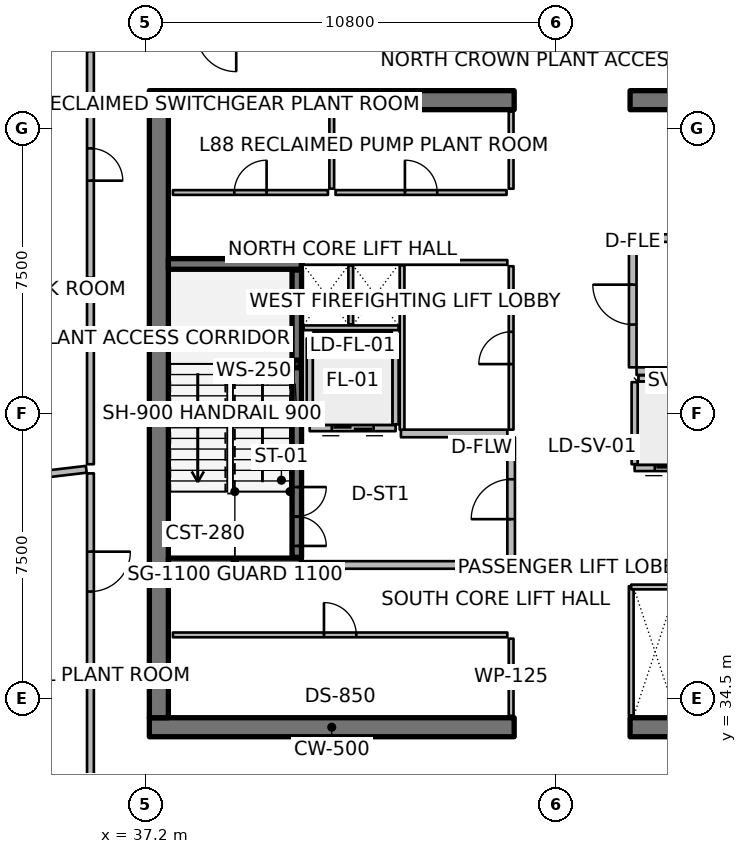
"""IFC4 building model, lengths in metres.
Left out: names, types, materials, properties, quantities, classifications, styles, units other than length and angle.
Written with IfcOpenShell. Run it as: python <this file> out.ifc"""

import sys

from ifc_helpers import new_model, si_unit, direction, frame, frame_2d, origin, origin_2d, place, context, subcontext, project, spatial, rectangle, hollow_rectangle, extrude, element, fill, save


model = new_model("IFC4")
c1 = context("Model", 3, precision=1e-05, world=origin(), true_north=direction((0.0, 1.0)))
c2 = subcontext(c1, "Body", "Model", "MODEL_VIEW")
j1 = project(units=[si_unit("LENGTHUNIT", "METRE"), si_unit("PLANEANGLEUNIT", "RADIAN")], contexts=[c1])
p1 = place(None, origin())
s1 = spatial("IfcSite", under=j1, at=p1, CompositionType="ELEMENT")
p2 = place(p1, origin())
s2 = spatial("IfcBuilding", under=s1, at=p2, CompositionType="ELEMENT")
p3 = place(p2, frame((0.0, 0.0, 351.5)))
s3 = spatial("IfcBuildingStorey", under=s2, at=p3, CompositionType="ELEMENT", Elevation=351.5)
p4 = place(p3, frame((37.3, 33.75, 0.0), z_axis=(0.0, 0.0, 1.0), x_axis=(1.0, 0.0, 0.0)))
e1 = element("IfcWall", 1, at=p4, inside=s3, PredefinedType="SHEAR", context=c2, shape_type="SweptSolid", body=[
    extrude(rectangle(XDim=9.6, YDim=0.5, at=frame_2d((4.8, 0.0))), origin(), (0.0, 0.0, 1.0), 4.5),
])
p5 = place(p3, frame((49.95, 33.75, 0.0), z_axis=(0.0, 0.0, 1.0), x_axis=(1.0, 0.0, 0.0)))
e2 = element("IfcWall", 2, at=p5, inside=s3, PredefinedType="SHEAR", context=c2, shape_type="SweptSolid", body=[
    extrude(rectangle(XDim=9.6, YDim=0.5, at=frame_2d((4.8, 0.0))), origin(), (0.0, 0.0, 1.0), 4.5),
])
p6 = place(p3, frame((37.3, 50.25, 0.0), z_axis=(0.0, 0.0, 1.0), x_axis=(1.0, 0.0, 0.0)))
e3 = element("IfcWall", 3, at=p6, inside=s3, PredefinedType="SHEAR", context=c2, shape_type="SweptSolid", body=[
    extrude(rectangle(XDim=9.6, YDim=0.5, at=frame_2d((4.8, 0.0))), origin(), (0.0, 0.0, 1.0), 4.5),
])
p7 = place(p3, frame((49.95, 50.25, 0.0), z_axis=(0.0, 0.0, 1.0), x_axis=(1.0, 0.0, 0.0)))
e4 = element("IfcWall", 4, at=p7, inside=s3, PredefinedType="SHEAR", context=c2, shape_type="SweptSolid", body=[
    extrude(rectangle(XDim=9.6, YDim=0.5, at=frame_2d((4.8, 0.0))), origin(), (0.0, 0.0, 1.0), 4.5),
])
p8 = place(p3, frame((37.55, 34.0, 0.0), z_axis=(0.0, 0.0, 1.0), x_axis=(0.0, 1.0, 0.0)))
e5 = element("IfcWall", 5, at=p8, inside=s3, PredefinedType="SHEAR", context=c2, shape_type="SweptSolid", body=[
    extrude(rectangle(XDim=16.0, YDim=0.5, at=frame_2d((8.0, 0.0))), origin(), (0.0, 0.0, 1.0), 4.5),
])
for number, where, z_axis, x_axis in (
    (6, (37.8, 38.06, 0.0), (0.0, 0.0, 1.0), (1.0, 0.0, 0.0)),
    (7, (37.8, 45.94, 0.0), (0.0, 0.0, 1.0), (1.0, 0.0, 0.0)),
):
    element("IfcWall", number, at=place(p3, frame(where, z_axis=z_axis, x_axis=x_axis)), inside=s3, PredefinedType="SHEAR", context=c2, shape_type="SweptSolid", body=[
        extrude(rectangle(XDim=3.5, YDim=0.28, at=frame_2d((1.75, 0.0))), origin(), (0.0, 0.0, 1.0), 4.5),
    ])
p9 = place(p3, frame((41.18, 43.31, 0.0), z_axis=(0.0, 0.0, 1.0), x_axis=(1.0, 0.0, 0.0)))
e8 = element("IfcColumn", 8, at=p9, inside=s3, PredefinedType="COLUMN", context=c2, shape_type="SweptSolid", body=[
    extrude(hollow_rectangle(XDim=0.2, YDim=0.2, WallThickness=0.01, InnerFilletRadius=0.01, OuterFilletRadius=0.02, at=origin_2d()), origin(), (0.0, 0.0, 1.0), 2.045),
])
p10 = place(p3, frame((41.18, 38.22, 0.0), z_axis=(0.0, 0.0, 1.0), x_axis=(0.0, 1.0, 0.0)))
e9 = element("IfcWall", 9, at=p10, inside=s3, PredefinedType="SOLIDWALL", context=c2, shape_type="SweptSolid", body=[
    extrude(rectangle(XDim=7.56, YDim=0.25, at=frame_2d((3.78, 0.0))), origin(), (0.0, 0.0, 1.0), 4.22),
])
p11 = place(p10, frame((0.3, 0.0, 0.0)))
e10 = element("IfcOpeningElement", 10, at=p11, cuts=e9, PredefinedType="OPENING", context=c2, shape_type="SweptSolid", body=[
    extrude(rectangle(XDim=1.55, YDim=2.15, at=frame_2d((0.775, 1.075))), frame((0.0, 0.135, 0.0), z_axis=(0.0, -1.0, 0.0), x_axis=(1.0, 0.0, 0.0)), (0.0, 0.0, 1.0), 0.27),
])
p12 = place(p3, frame((43.78, 41.62, 0.0), z_axis=(0.0, 0.0, 1.0), x_axis=(-1.0, 0.0, 0.0)))
e11 = element("IfcWall", 11, at=p12, inside=s3, PredefinedType="PARTITIONING", context=c2, shape_type="SweptSolid", body=[
    extrude(rectangle(XDim=2.26, YDim=0.16, at=frame_2d((1.13, 0.0))), origin(), (0.0, 0.0, 1.0), 4.22),
])
p13 = place(p12, frame((0.58, 0.0, 0.0)))
e12 = element("IfcOpeningElement", 12, at=p13, cuts=e11, PredefinedType="OPENING", context=c2, shape_type="SweptSolid", body=[
    extrude(rectangle(XDim=1.1, YDim=2.1, at=frame_2d((0.55, 1.05))), frame((0.0, 0.09, 0.0), z_axis=(0.0, -1.0, 0.0), x_axis=(1.0, 0.0, 0.0)), (0.0, 0.0, 1.0), 0.18),
])
for number, where, z_axis, x_axis in (
    (13, (43.78, 41.72, 0.0), (0.0, 0.0, 1.0), (0.0, 1.0, 0.0)),
    (14, (41.52, 41.72, 0.0), (0.0, 0.0, 1.0), (0.0, 1.0, 0.0)),
):
    element("IfcWall", number, at=place(p3, frame(where, z_axis=z_axis, x_axis=x_axis)), inside=s3, PredefinedType="PARTITIONING", context=c2, shape_type="SweptSolid", body=[
        extrude(rectangle(XDim=2.26, YDim=0.16, at=frame_2d((1.13, 0.0))), origin(), (0.0, 0.0, 1.0), 4.22),
    ])
p14 = place(p3, frame((41.62, 44.08, 0.0), z_axis=(0.0, 0.0, 1.0), x_axis=(1.0, 0.0, 0.0)))
e15 = element("IfcWall", 15, at=p14, inside=s3, PredefinedType="PARTITIONING", context=c2, shape_type="SweptSolid", body=[
    extrude(rectangle(XDim=2.06, YDim=0.16, at=frame_2d((1.03, 0.0))), origin(), (0.0, 0.0, 1.0), 4.22),
])
p15 = place(p3, frame((52.23, 40.57, 0.0), z_axis=(0.0, 0.0, 1.0), x_axis=(-1.0, 0.0, 0.0)))
e16 = element("IfcWall", 16, at=p15, inside=s3, PredefinedType="PARTITIONING", context=c2, shape_type="SweptSolid", body=[
    extrude(rectangle(XDim=2.16, YDim=0.16, at=frame_2d((1.08, 0.0))), origin(), (0.0, 0.0, 1.0), 4.22),
])
p16 = place(p15, frame((0.53, 0.0, 0.0)))
e17 = element("IfcOpeningElement", 17, at=p16, cuts=e16, PredefinedType="OPENING", context=c2, shape_type="SweptSolid", body=[
    extrude(rectangle(XDim=1.1, YDim=2.1, at=frame_2d((0.55, 1.05))), frame((0.0, 0.09, 0.0), z_axis=(0.0, -1.0, 0.0), x_axis=(1.0, 0.0, 0.0)), (0.0, 0.0, 1.0), 0.18),
])
p17 = place(p3, frame((50.07, 40.67, 0.0), z_axis=(0.0, 0.0, 1.0), x_axis=(0.0, 1.0, 0.0)))
e18 = element("IfcWall", 18, at=p17, inside=s3, PredefinedType="PARTITIONING", context=c2, shape_type="SweptSolid", body=[
    extrude(rectangle(XDim=2.16, YDim=0.16, at=frame_2d((1.08, 0.0))), origin(), (0.0, 0.0, 1.0), 4.22),
])
p18 = place(p3, frame((50.17, 42.93, 0.0), z_axis=(0.0, 0.0, 1.0), x_axis=(1.0, 0.0, 0.0)))
e19 = element("IfcWall", 19, at=p18, inside=s3, PredefinedType="PARTITIONING", context=c2, shape_type="SweptSolid", body=[
    extrude(rectangle(XDim=1.96, YDim=0.16, at=frame_2d((0.98, 0.0))), origin(), (0.0, 0.0, 1.0), 4.22),
])
p19 = place(p3, frame((46.82, 34.05, 0.0), z_axis=(0.0, 0.0, 1.0), x_axis=(0.0, 1.0, 0.0)))
e20 = element("IfcWall", 20, at=p19, inside=s3, PredefinedType="PARTITIONING", context=c2, shape_type="SweptSolid", body=[
    extrude(rectangle(XDim=2.03, YDim=0.125, at=frame_2d((1.015, 0.0))), origin(), (0.0, 0.0, 1.0), 3.66),
])
p20 = place(p3, frame((37.92, 36.18, 0.0), z_axis=(0.0, 0.0, 1.0), x_axis=(1.0, 0.0, 0.0)))
e21 = element("IfcWall", 21, at=p20, inside=s3, PredefinedType="PARTITIONING", context=c2, shape_type="SweptSolid", body=[
    extrude(rectangle(XDim=8.8, YDim=0.125, at=frame_2d((4.4, 0.0))), origin(), (0.0, 0.0, 1.0), 3.66),
])
p21 = place(p20, frame((3.975, 0.0, 0.0)))
e22 = element("IfcOpeningElement", 22, at=p21, cuts=e21, PredefinedType="OPENING", context=c2, shape_type="SweptSolid", body=[
    extrude(rectangle(XDim=0.85, YDim=2.06, at=frame_2d((0.425, 1.03))), frame((0.0, 0.073, 0.0), z_axis=(0.0, -1.0, 0.0), x_axis=(1.0, 0.0, 0.0)), (0.0, 0.0, 1.0), 0.145),
])
for number, where, z_axis, x_axis in (
    (23, (46.82, 47.92, 0.0), (0.0, 0.0, 1.0), (0.0, 1.0, 0.0)),
    (24, (42.1, 47.92, 0.0), (0.0, 0.0, 1.0), (0.0, 1.0, 0.0)),
):
    element("IfcWall", number, at=place(p3, frame(where, z_axis=z_axis, x_axis=x_axis)), inside=s3, PredefinedType="PARTITIONING", context=c2, shape_type="SweptSolid", body=[
        extrude(rectangle(XDim=2.03, YDim=0.125, at=frame_2d((1.015, 0.0))), origin(), (0.0, 0.0, 1.0), 3.66),
    ])
p22 = place(p3, frame((37.92, 47.82, 0.0), z_axis=(0.0, 0.0, 1.0), x_axis=(1.0, 0.0, 0.0)))
e25 = element("IfcWall", 25, at=p22, inside=s3, PredefinedType="PARTITIONING", context=c2, shape_type="SweptSolid", body=[
    extrude(rectangle(XDim=4.08, YDim=0.125, at=frame_2d((2.04, 0.0))), origin(), (0.0, 0.0, 1.0), 3.66),
])
p23 = place(p22, frame((1.615, 0.0, 0.0)))
e26 = element("IfcOpeningElement", 26, at=p23, cuts=e25, PredefinedType="OPENING", context=c2, shape_type="SweptSolid", body=[
    extrude(rectangle(XDim=0.85, YDim=2.06, at=frame_2d((0.425, 1.03))), frame((0.0, 0.073, 0.0), z_axis=(0.0, -1.0, 0.0), x_axis=(1.0, 0.0, 0.0)), (0.0, 0.0, 1.0), 0.145),
])
p24 = place(p3, frame((42.2, 47.82, 0.0), z_axis=(0.0, 0.0, 1.0), x_axis=(1.0, 0.0, 0.0)))
e27 = element("IfcWall", 27, at=p24, inside=s3, PredefinedType="PARTITIONING", context=c2, shape_type="SweptSolid", body=[
    extrude(rectangle(XDim=4.5, YDim=0.125, at=frame_2d((2.25, 0.0))), origin(), (0.0, 0.0, 1.0), 3.66),
])
p25 = place(p24, frame((1.825, 0.0, 0.0)))
e28 = element("IfcOpeningElement", 28, at=p25, cuts=e27, PredefinedType="OPENING", context=c2, shape_type="SweptSolid", body=[
    extrude(rectangle(XDim=0.85, YDim=2.06, at=frame_2d((0.425, 1.03))), frame((0.0, 0.073, 0.0), z_axis=(0.0, -1.0, 0.0), x_axis=(1.0, 0.0, 0.0)), (0.0, 0.0, 1.0), 0.145),
])
p26 = place(p3, frame((41.35, 38.02, 0.0), z_axis=(0.0, 0.0, 1.0), x_axis=(1.0, 0.0, 0.0)))
e29 = element("IfcWall", 29, at=p26, inside=s3, PredefinedType="PARTITIONING", context=c2, shape_type="SweptSolid", body=[
    extrude(rectangle(XDim=5.37, YDim=0.2, at=frame_2d((2.685, 0.0))), origin(), (0.0, 0.0, 1.0), 4.22),
])
p27 = place(p3, frame((43.92, 41.48, 0.0), z_axis=(0.0, 0.0, 1.0), x_axis=(1.0, 0.0, 0.0)))
e30 = element("IfcWall", 30, at=p27, inside=s3, PredefinedType="PARTITIONING", context=c2, shape_type="SweptSolid", body=[
    extrude(rectangle(XDim=2.8, YDim=0.2, at=frame_2d((1.4, 0.0))), origin(), (0.0, 0.0, 1.0), 4.22),
])
p28 = place(p3, frame((46.82, 38.12, 0.0), z_axis=(0.0, 0.0, 1.0), x_axis=(0.0, 1.0, 0.0)))
e31 = element("IfcWall", 31, at=p28, inside=s3, PredefinedType="PARTITIONING", context=c2, shape_type="SweptSolid", body=[
    extrude(rectangle(XDim=3.26, YDim=0.2, at=frame_2d((1.63, 0.0))), origin(), (0.0, 0.0, 1.0), 4.22),
])
p29 = place(p28, frame((1.105, 0.0, 0.0)))
e32 = element("IfcOpeningElement", 32, at=p29, cuts=e31, PredefinedType="OPENING", context=c2, shape_type="SweptSolid", body=[
    extrude(rectangle(XDim=1.05, YDim=2.1, at=frame_2d((0.525, 1.05))), frame((0.0, 0.11, 0.0), z_axis=(0.0, -1.0, 0.0), x_axis=(1.0, 0.0, 0.0)), (0.0, 0.0, 1.0), 0.22),
])
p30 = place(p3, frame((50.12, 43.12, 0.0), z_axis=(0.0, 0.0, 1.0), x_axis=(1.0, 0.0, 0.0)))
e33 = element("IfcWall", 33, at=p30, inside=s3, PredefinedType="PARTITIONING", context=c2, shape_type="SweptSolid", body=[
    extrude(rectangle(XDim=8.88, YDim=0.2, at=frame_2d((4.44, 0.0))), origin(), (0.0, 0.0, 1.0), 4.22),
])
p31 = place(p3, frame((50.14, 46.62, 0.0), z_axis=(0.0, 0.0, 1.0), x_axis=(1.0, 0.0, 0.0)))
e34 = element("IfcWall", 34, at=p31, inside=s3, PredefinedType="PARTITIONING", context=c2, shape_type="SweptSolid", body=[
    extrude(rectangle(XDim=1.02, YDim=0.2, at=frame_2d((0.51, 0.0))), origin(), (0.0, 0.0, 1.0), 4.22),
])
p32 = place(p3, frame((50.02, 43.22, 0.0), z_axis=(0.0, 0.0, 1.0), x_axis=(0.0, 1.0, 0.0)))
e35 = element("IfcWall", 35, at=p32, inside=s3, PredefinedType="PARTITIONING", context=c2, shape_type="SweptSolid", body=[
    extrude(rectangle(XDim=3.3, YDim=0.2, at=frame_2d((1.65, 0.0))), origin(), (0.0, 0.0, 1.0), 4.22),
])
p33 = place(p32, frame((1.125, 0.0, 0.0)))
e36 = element("IfcOpeningElement", 36, at=p33, cuts=e35, PredefinedType="OPENING", context=c2, shape_type="SweptSolid", body=[
    extrude(rectangle(XDim=1.05, YDim=2.1, at=frame_2d((0.525, 1.05))), frame((0.0, 0.11, 0.0), z_axis=(0.0, -1.0, 0.0), x_axis=(1.0, 0.0, 0.0)), (0.0, 0.0, 1.0), 0.22),
])
p34 = place(p3, frame((41.36, 45.98, 0.0), z_axis=(0.0, 0.0, 1.0), x_axis=(1.0, 0.0, 0.0)))
e37 = element("IfcWall", 37, at=p34, inside=s3, PredefinedType="PARTITIONING", context=c2, shape_type="SweptSolid", body=[
    extrude(rectangle(XDim=5.36, YDim=0.125, at=frame_2d((2.68, 0.0))), origin(), (0.0, 0.0, 1.0), 3.66),
])
p35 = place(p3, frame((41.36, 44.26, 0.0), z_axis=(0.0, 0.0, 1.0), x_axis=(1.0, 0.0, 0.0)))
e38 = element("IfcWall", 38, at=p35, inside=s3, PredefinedType="PARTITIONING", context=c2, shape_type="SweptSolid", body=[
    extrude(rectangle(XDim=2.5, YDim=0.125, at=frame_2d((1.25, 0.0))), origin(), (0.0, 0.0, 1.0), 3.66),
])
p36 = place(p3, frame((42.6, 44.35, 0.0), z_axis=(0.0, 0.0, 1.0), x_axis=(0.0, 1.0, 0.0)))
e39 = element("IfcWall", 39, at=p36, inside=s3, PredefinedType="PARTITIONING", context=c2, shape_type="SweptSolid", body=[
    extrude(rectangle(XDim=1.55, YDim=0.125, at=frame_2d((0.775, 0.0))), origin(), (0.0, 0.0, 1.0), 3.66),
])
p37 = place(p3, frame((49.98, 34.06, 0.0), z_axis=(0.0, 0.0, 1.0), x_axis=(0.0, 1.0, 0.0)))
e40 = element("IfcWall", 40, at=p37, inside=s3, PredefinedType="PARTITIONING", context=c2, shape_type="SweptSolid", body=[
    extrude(rectangle(XDim=3.4, YDim=0.125, at=frame_2d((1.7, 0.0))), origin(), (0.0, 0.0, 1.0), 3.66),
])
p38 = place(p3, frame((49.98, 37.44, 0.0), z_axis=(0.0, 0.0, 1.0), x_axis=(1.0, 0.0, 0.0)))
e41 = element("IfcWall", 41, at=p38, inside=s3, PredefinedType="PARTITIONING", context=c2, shape_type="SweptSolid", body=[
    extrude(rectangle(XDim=1.26, YDim=0.125, at=frame_2d((0.63, 0.0))), origin(), (0.0, 0.0, 1.0), 3.66),
])
p39 = place(p3, frame((43.95, 41.58, 0.0), z_axis=(0.0, 0.0, 1.0), x_axis=(0.0, 1.0, 0.0)))
e42 = element("IfcWall", 42, at=p39, inside=s3, PredefinedType="PARTITIONING", context=c2, shape_type="SweptSolid", body=[
    extrude(rectangle(XDim=4.32, YDim=0.125, at=frame_2d((2.16, 0.0))), origin(), (0.0, 0.0, 1.0), 3.66),
])
p40 = place(p3, frame((46.82, 41.58, 0.0), z_axis=(0.0, 0.0, 1.0), x_axis=(0.0, 1.0, 0.0)))
e43 = element("IfcWall", 43, at=p40, inside=s3, PredefinedType="PARTITIONING", context=c2, shape_type="SweptSolid", body=[
    extrude(rectangle(XDim=4.3, YDim=0.125, at=frame_2d((2.15, 0.0))), origin(), (0.0, 0.0, 1.0), 3.66),
])
p41 = place(p40, frame((1.725, 0.0, 0.0)))
e44 = element("IfcOpeningElement", 44, at=p41, cuts=e43, PredefinedType="OPENING", context=c2, shape_type="SweptSolid", body=[
    extrude(rectangle(XDim=0.85, YDim=2.06, at=frame_2d((0.425, 1.03))), frame((0.0, 0.073, 0.0), z_axis=(0.0, -1.0, 0.0), x_axis=(1.0, 0.0, 0.0)), (0.0, 0.0, 1.0), 0.145),
])
p42 = place(p3, frame((35.75, 51.537, 0.0), z_axis=(0.0, 0.0, 1.0), x_axis=(0.0, -1.0, 0.0)))
e45 = element("IfcWall", 45, at=p42, inside=s3, PredefinedType="PARTITIONING", context=c2, shape_type="SweptSolid", body=[
    extrude(rectangle(XDim=5.962, YDim=0.18, at=frame_2d((2.981, 0.0))), origin(), (0.0, 0.0, 1.0), 3.213),
])
p43 = place(p42, frame((2.556, 0.0, 0.0)))
e46 = element("IfcOpeningElement", 46, at=p43, cuts=e45, PredefinedType="OPENING", context=c2, shape_type="SweptSolid", body=[
    extrude(rectangle(XDim=0.85, YDim=2.06, at=frame_2d((0.425, 1.03))), frame((0.0, 0.1, 0.0), z_axis=(0.0, -1.0, 0.0), x_axis=(1.0, 0.0, 0.0)), (0.0, 0.0, 1.0), 0.2),
])
p44 = place(p3, frame((35.75, 45.335, 0.0), z_axis=(0.0, 0.0, 1.0), x_axis=(0.0, -1.0, 0.0)))
e47 = element("IfcWall", 47, at=p44, inside=s3, PredefinedType="PARTITIONING", context=c2, shape_type="SweptSolid", body=[
    extrude(rectangle(XDim=4.665, YDim=0.18, at=frame_2d((2.333, 0.0))), origin(), (0.0, 0.0, 1.0), 3.213),
])
p45 = place(p3, frame((35.641, 40.537, 0.0), z_axis=(0.0, 0.0, 1.0), x_axis=(-0.993070751419, -0.117518010011, 0.0)))
e48 = element("IfcWall", 48, at=p45, inside=s3, PredefinedType="PARTITIONING", context=c2, shape_type="SweptSolid", body=[
    extrude(rectangle(XDim=8.686, YDim=0.18, at=frame_2d((4.343, 0.0))), origin(), (0.0, 0.0, 1.0), 3.213),
])
p46 = place(p3, frame((35.75, 40.43, 0.0), z_axis=(0.0, 0.0, 1.0), x_axis=(0.0, -1.0, 0.0)))
e49 = element("IfcWall", 49, at=p46, inside=s3, PredefinedType="PARTITIONING", context=c2, shape_type="SweptSolid", body=[
    extrude(rectangle(XDim=5.17, YDim=0.18, at=frame_2d((2.585, 0.0))), origin(), (0.0, 0.0, 1.0), 3.213),
])
p47 = place(p46, frame((2.06, 0.0, 0.0)))
e50 = element("IfcOpeningElement", 50, at=p47, cuts=e49, PredefinedType="OPENING", context=c2, shape_type="SweptSolid", body=[
    extrude(rectangle(XDim=1.05, YDim=2.1, at=frame_2d((0.525, 1.05))), frame((0.0, 0.1, 0.0), z_axis=(0.0, -1.0, 0.0), x_axis=(1.0, 0.0, 0.0)), (0.0, 0.0, 1.0), 0.2),
])
p48 = place(p3, frame((35.75, 35.02, 0.0), z_axis=(0.0, 0.0, 1.0), x_axis=(0.0, -1.0, 0.0)))
e51 = element("IfcWall", 51, at=p48, inside=s3, PredefinedType="PARTITIONING", context=c2, shape_type="SweptSolid", body=[
    extrude(rectangle(XDim=2.95, YDim=0.18, at=frame_2d((1.475, 0.0))), origin(), (0.0, 0.0, 1.0), 3.213),
])
p49 = place(p11, origin())
e52 = element("IfcDoor", 52, at=p49, inside=s3, OperationType="DOUBLE_DOOR_SINGLE_SWING", PredefinedType="DOOR", context=c2, shape_type="SweptSolid", body=[
    extrude(rectangle(XDim=1.55, YDim=2.15, at=frame_2d((0.775, 1.075))), frame((0.0, 0.025, 0.0), z_axis=(0.0, -1.0, 0.0), x_axis=(1.0, 0.0, 0.0)), (0.0, 0.0, 1.0), 0.05),
])
fill(e10, e52)
p50 = place(p13, origin())
e53 = element("IfcDoor", 53, at=p50, inside=s3, OperationType="DOUBLE_DOOR_SLIDING", PredefinedType="DOOR", context=c2, shape_type="SweptSolid", body=[
    extrude(rectangle(XDim=1.1, YDim=2.1, at=frame_2d((0.55, 1.05))), frame((0.0, 0.025, 0.0), z_axis=(0.0, -1.0, 0.0), x_axis=(1.0, 0.0, 0.0)), (0.0, 0.0, 1.0), 0.05),
])
fill(e12, e53)
p51 = place(p16, origin())
e54 = element("IfcDoor", 54, at=p51, inside=s3, OperationType="DOUBLE_DOOR_SLIDING", PredefinedType="DOOR", context=c2, shape_type="SweptSolid", body=[
    extrude(rectangle(XDim=1.1, YDim=2.1, at=frame_2d((0.55, 1.05))), frame((0.0, 0.025, 0.0), z_axis=(0.0, -1.0, 0.0), x_axis=(1.0, 0.0, 0.0)), (0.0, 0.0, 1.0), 0.05),
])
fill(e17, e54)
p52 = place(p21, origin())
e55 = element("IfcDoor", 55, at=p52, inside=s3, OperationType="SINGLE_SWING_LEFT", PredefinedType="DOOR", context=c2, shape_type="SweptSolid", body=[
    extrude(rectangle(XDim=0.85, YDim=2.06, at=frame_2d((0.425, 1.03))), frame((0.0, 0.025, 0.0), z_axis=(0.0, -1.0, 0.0), x_axis=(1.0, 0.0, 0.0)), (0.0, 0.0, 1.0), 0.05),
])
fill(e22, e55)
p53 = place(p23, origin())
e56 = element("IfcDoor", 56, at=p53, inside=s3, OperationType="SINGLE_SWING_RIGHT", PredefinedType="DOOR", context=c2, shape_type="SweptSolid", body=[
    extrude(rectangle(XDim=0.85, YDim=2.06, at=frame_2d((0.425, 1.03))), frame((0.0, 0.025, 0.0), z_axis=(0.0, -1.0, 0.0), x_axis=(1.0, 0.0, 0.0)), (0.0, 0.0, 1.0), 0.05),
])
fill(e26, e56)
p54 = place(p25, origin())
e57 = element("IfcDoor", 57, at=p54, inside=s3, OperationType="SINGLE_SWING_LEFT", PredefinedType="DOOR", context=c2, shape_type="SweptSolid", body=[
    extrude(rectangle(XDim=0.85, YDim=2.06, at=frame_2d((0.425, 1.03))), frame((0.0, 0.025, 0.0), z_axis=(0.0, -1.0, 0.0), x_axis=(1.0, 0.0, 0.0)), (0.0, 0.0, 1.0), 0.05),
])
fill(e28, e57)
p55 = place(p29, origin())
e58 = element("IfcDoor", 58, at=p55, inside=s3, OperationType="SINGLE_SWING_LEFT", PredefinedType="DOOR", context=c2, shape_type="SweptSolid", body=[
    extrude(rectangle(XDim=1.05, YDim=2.1, at=frame_2d((0.525, 1.05))), frame((0.0, 0.025, 0.0), z_axis=(0.0, -1.0, 0.0), x_axis=(1.0, 0.0, 0.0)), (0.0, 0.0, 1.0), 0.05),
])
fill(e32, e58)
p56 = place(p33, origin())
e59 = element("IfcDoor", 59, at=p56, inside=s3, OperationType="SINGLE_SWING_RIGHT", PredefinedType="DOOR", context=c2, shape_type="SweptSolid", body=[
    extrude(rectangle(XDim=1.05, YDim=2.1, at=frame_2d((0.525, 1.05))), frame((0.0, 0.025, 0.0), z_axis=(0.0, -1.0, 0.0), x_axis=(1.0, 0.0, 0.0)), (0.0, 0.0, 1.0), 0.05),
])
fill(e36, e59)
p57 = place(p41, origin())
e60 = element("IfcDoor", 60, at=p57, inside=s3, OperationType="SINGLE_SWING_LEFT", PredefinedType="DOOR", context=c2, shape_type="SweptSolid", body=[
    extrude(rectangle(XDim=0.85, YDim=2.06, at=frame_2d((0.425, 1.03))), frame((0.0, 0.025, 0.0), z_axis=(0.0, -1.0, 0.0), x_axis=(1.0, 0.0, 0.0)), (0.0, 0.0, 1.0), 0.05),
])
fill(e44, e60)
p58 = place(p43, origin())
e61 = element("IfcDoor", 61, at=p58, inside=s3, OperationType="SINGLE_SWING_RIGHT", PredefinedType="DOOR", context=c2, shape_type="SweptSolid", body=[
    extrude(rectangle(XDim=0.85, YDim=2.06, at=frame_2d((0.425, 1.03))), frame((0.0, 0.025, 0.0), z_axis=(0.0, -1.0, 0.0), x_axis=(1.0, 0.0, 0.0)), (0.0, 0.0, 1.0), 0.05),
])
fill(e46, e61)
p59 = place(p47, origin())
e62 = element("IfcDoor", 62, at=p59, inside=s3, OperationType="SINGLE_SWING_LEFT", PredefinedType="DOOR", context=c2, shape_type="SweptSolid", body=[
    extrude(rectangle(XDim=1.05, YDim=2.1, at=frame_2d((0.525, 1.05))), frame((0.0, 0.025, 0.0), z_axis=(0.0, -1.0, 0.0), x_axis=(1.0, 0.0, 0.0)), (0.0, 0.0, 1.0), 0.05),
])
fill(e50, e62)
save(model, sys.argv[1])
